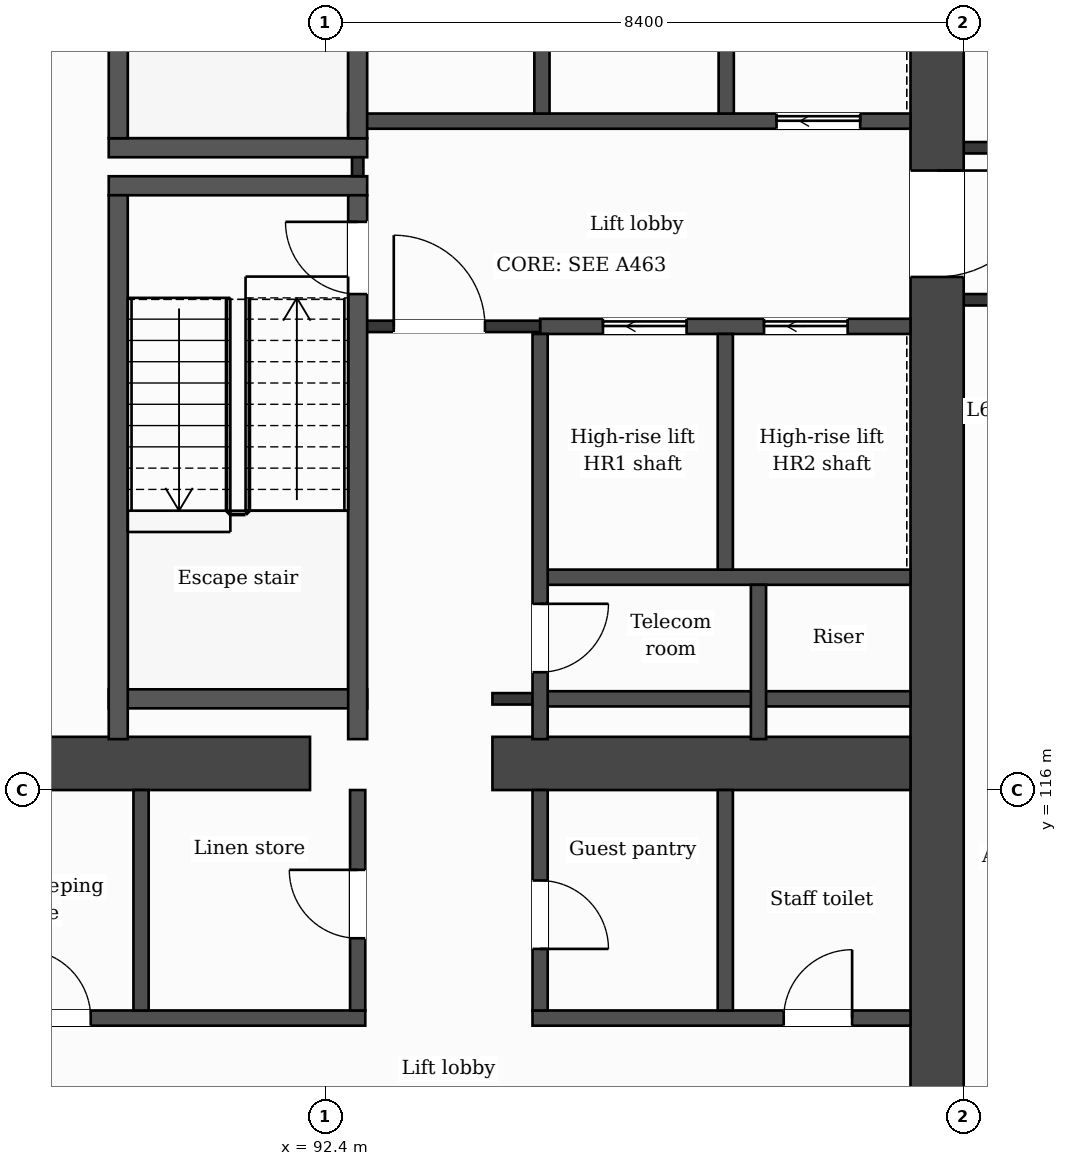
"""IFC4 building model, lengths in metres.
Left out: names, types, materials, properties, quantities, classifications, styles, units other than length and angle.
Written with IfcOpenShell. Run it as: python <this file> out.ifc"""

import sys

from ifc_helpers import new_model, si_unit, direction, frame, frame_2d, origin, place, context, subcontext, project, spatial, rectangle, extrude, element, fill, save


model = new_model("IFC4")
c1 = context("Model", 3, precision=1e-05, world=origin(), true_north=direction((0.0, 1.0)))
c2 = subcontext(c1, "Body", "Model", "MODEL_VIEW")
j1 = project(units=[si_unit("LENGTHUNIT", "METRE"), si_unit("PLANEANGLEUNIT", "RADIAN")], contexts=[c1])
p1 = place(None, origin())
s1 = spatial("IfcSite", under=j1, at=p1, CompositionType="ELEMENT")
p2 = place(p1, origin())
s2 = spatial("IfcBuilding", under=s1, at=p2, CompositionType="ELEMENT")
p3 = place(p2, frame((0.0, 0.0, 259.0)))
s3 = spatial("IfcBuildingStorey", under=s2, at=p3, CompositionType="ELEMENT", Elevation=259.0)
p4 = place(p3, frame((100.45, 132.05, 0.0), z_axis=(0.0, 0.0, 1.0), x_axis=(0.0, -1.0, 0.0)))
e1 = element("IfcWall", 1, at=p4, inside=s3, PredefinedType="SHEAR", context=c2, shape_type="SweptSolid", body=[
    extrude(rectangle(XDim=21.3, YDim=0.7, at=frame_2d((10.65, 0.0))), origin(), (0.0, 0.0, 1.0), 3.7),
])
p5 = place(p4, frame((7.9, 0.0, 0.0)))
e2 = element("IfcOpeningElement", 2, at=p5, cuts=e1, PredefinedType="OPENING", context=c2, shape_type="SweptSolid", body=[
    extrude(rectangle(XDim=1.4, YDim=2.1, at=frame_2d((0.7, 1.05))), frame((0.0, 0.36, 0.0), z_axis=(0.0, -1.0, 0.0), x_axis=(1.0, 0.0, 0.0)), (0.0, 0.0, 1.0), 0.72),
])
p6 = place(p3, frame((86.07, 110.75, 0.0), z_axis=(0.0, 0.0, 1.0), x_axis=(0.133406218907, 0.991061441464, 0.0)))
e3 = element("IfcWall", 3, at=p6, inside=s3, PredefinedType="SHEAR", context=c2, shape_type="SweptSolid", body=[
    extrude(rectangle(XDim=21.492, YDim=0.7, at=frame_2d((10.746, 0.0))), origin(), (0.0, 0.0, 1.0), 3.7),
])
p7 = place(p3, frame((87.123, 116.35, 0.0), z_axis=(0.0, 0.0, 1.0), x_axis=(1.0, 0.0, 0.0)))
e4 = element("IfcWall", 4, at=p7, inside=s3, PredefinedType="SHEAR", context=c2, shape_type="SweptSolid", body=[
    extrude(rectangle(XDim=5.077, YDim=0.7, at=frame_2d((2.539, 0.0))), origin(), (0.0, 0.0, 1.0), 3.7),
])
p8 = place(p3, frame((94.6, 116.35, 0.0), z_axis=(0.0, 0.0, 1.0), x_axis=(1.0, 0.0, 0.0)))
e5 = element("IfcWall", 5, at=p8, inside=s3, PredefinedType="SHEAR", context=c2, shape_type="SweptSolid", body=[
    extrude(rectangle(XDim=5.5, YDim=0.7, at=frame_2d((2.75, 0.0))), origin(), (0.0, 0.0, 1.0), 3.7),
])
p9 = place(p3, frame((86.696, 113.0, 0.0), z_axis=(0.0, 0.0, 1.0), x_axis=(1.0, 0.0, 0.0)))
e6 = element("IfcWall", 6, at=p9, inside=s3, PredefinedType="PARTITIONING", context=c2, shape_type="SweptSolid", body=[
    extrude(rectangle(XDim=6.231, YDim=0.2, at=frame_2d((3.116, 0.0))), origin(), (0.0, 0.0, 1.0), 3.38),
])
p10 = place(p9, frame((1.719, 0.0, 0.0)))
e7 = element("IfcOpeningElement", 7, at=p10, cuts=e6, PredefinedType="OPENING", context=c2, shape_type="SweptSolid", body=[
    extrude(rectangle(XDim=0.9, YDim=2.1, at=frame_2d((0.45, 1.05))), frame((0.0, 0.11, 0.0), z_axis=(0.0, -1.0, 0.0), x_axis=(1.0, 0.0, 0.0)), (0.0, 0.0, 1.0), 0.22),
])
p11 = place(p3, frame((95.127, 113.0, 0.0), z_axis=(0.0, 0.0, 1.0), x_axis=(1.0, 0.0, 0.0)))
e8 = element("IfcWall", 8, at=p11, inside=s3, PredefinedType="PARTITIONING", context=c2, shape_type="SweptSolid", body=[
    extrude(rectangle(XDim=4.973, YDim=0.2, at=frame_2d((2.487, 0.0))), origin(), (0.0, 0.0, 1.0), 3.38),
])
p12 = place(p11, frame((3.305, 0.0, 0.0)))
e9 = element("IfcOpeningElement", 9, at=p12, cuts=e8, PredefinedType="OPENING", context=c2, shape_type="SweptSolid", body=[
    extrude(rectangle(XDim=0.9, YDim=2.1, at=frame_2d((0.45, 1.05))), frame((0.0, 0.11, 0.0), z_axis=(0.0, -1.0, 0.0), x_axis=(1.0, 0.0, 0.0)), (0.0, 0.0, 1.0), 0.22),
])
p13 = place(p3, frame((95.227, 117.2, 0.0), z_axis=(0.0, 0.0, 1.0), x_axis=(1.0, 0.0, 0.0)))
e10 = element("IfcWall", 10, at=p13, inside=s3, PredefinedType="PARTITIONING", context=c2, shape_type="SweptSolid", body=[
    extrude(rectangle(XDim=4.873, YDim=0.2, at=frame_2d((2.437, 0.0))), origin(), (0.0, 0.0, 1.0), 3.38),
])
p14 = place(p3, frame((94.6, 117.2, 0.0), z_axis=(0.0, 0.0, 1.0), x_axis=(1.0, 0.0, 0.0)))
e11 = element("IfcWall", 11, at=p14, inside=s3, PredefinedType="PARTITIONING", context=c2, shape_type="SweptSolid", body=[
    extrude(rectangle(XDim=0.627, YDim=0.15, at=frame_2d((0.313, 0.0))), origin(), (0.0, 0.0, 1.0), 3.38),
])
p15 = place(p3, frame((89.552, 117.2, 0.0), z_axis=(0.0, 0.0, 1.0), x_axis=(1.0, 0.0, 0.0)))
e12 = element("IfcWall", 12, at=p15, inside=s3, PredefinedType="PARTITIONING", context=c2, shape_type="SweptSolid", body=[
    extrude(rectangle(XDim=3.4, YDim=0.25, at=frame_2d((1.7, 0.0))), origin(), (0.0, 0.0, 1.0), 3.38),
])
p16 = place(p3, frame((95.227, 118.8, 0.0), z_axis=(0.0, 0.0, 1.0), x_axis=(1.0, 0.0, 0.0)))
e13 = element("IfcWall", 13, at=p16, inside=s3, PredefinedType="PARTITIONING", context=c2, shape_type="SweptSolid", body=[
    extrude(rectangle(XDim=4.873, YDim=0.2, at=frame_2d((2.437, 0.0))), origin(), (0.0, 0.0, 1.0), 3.38),
])
p17 = place(p3, frame((95.227, 122.1, 0.0), z_axis=(0.0, 0.0, 1.0), x_axis=(1.0, 0.0, 0.0)))
e14 = element("IfcWall", 14, at=p17, inside=s3, PredefinedType="PARTITIONING", context=c2, shape_type="SweptSolid", body=[
    extrude(rectangle(XDim=4.873, YDim=0.2, at=frame_2d((2.437, 0.0))), origin(), (0.0, 0.0, 1.0), 3.38),
])
p18 = place(p17, frame((0.827, 0.0, 0.0)))
e15 = element("IfcOpeningElement", 15, at=p18, cuts=e14, PredefinedType="OPENING", context=c2, shape_type="SweptSolid", body=[
    extrude(rectangle(XDim=1.1, YDim=2.1, at=frame_2d((0.55, 1.05))), frame((0.0, 0.11, 0.0), z_axis=(0.0, -1.0, 0.0), x_axis=(1.0, 0.0, 0.0)), (0.0, 0.0, 1.0), 0.22),
])
p19 = place(p17, frame((2.946, 0.0, 0.0)))
e16 = element("IfcOpeningElement", 16, at=p19, cuts=e14, PredefinedType="OPENING", context=c2, shape_type="SweptSolid", body=[
    extrude(rectangle(XDim=1.1, YDim=2.1, at=frame_2d((0.55, 1.05))), frame((0.0, 0.11, 0.0), z_axis=(0.0, -1.0, 0.0), x_axis=(1.0, 0.0, 0.0)), (0.0, 0.0, 1.0), 0.22),
])
p20 = place(p3, frame((92.827, 122.1, 0.0), z_axis=(0.0, 0.0, 1.0), x_axis=(1.0, 0.0, 0.0)))
e17 = element("IfcWall", 17, at=p20, inside=s3, PredefinedType="PARTITIONING", context=c2, shape_type="SweptSolid", body=[
    extrude(rectangle(XDim=2.4, YDim=0.15, at=frame_2d((1.2, 0.0))), origin(), (0.0, 0.0, 1.0), 3.38),
])
p21 = place(p20, frame((0.475, 0.0, 0.0)))
e18 = element("IfcOpeningElement", 18, at=p21, cuts=e17, PredefinedType="OPENING", context=c2, shape_type="SweptSolid", body=[
    extrude(rectangle(XDim=1.2, YDim=2.1, at=frame_2d((0.6, 1.05))), frame((0.0, 0.085, 0.0), z_axis=(0.0, -1.0, 0.0), x_axis=(1.0, 0.0, 0.0)), (0.0, 0.0, 1.0), 0.17),
])
p22 = place(p3, frame((100.8, 122.45, 0.0), z_axis=(0.0, 0.0, 1.0), x_axis=(1.0, 0.0, 0.0)))
e19 = element("IfcWall", 19, at=p22, inside=s3, PredefinedType="PARTITIONING", context=c2, shape_type="SweptSolid", body=[
    extrude(rectangle(XDim=25.2, YDim=0.15, at=frame_2d((12.6, 0.0))), origin(), (0.0, 0.0, 1.0), 3.38),
])
p23 = place(p22, frame((0.63, 0.0, 0.0)))
e20 = element("IfcOpeningElement", 20, at=p23, cuts=e19, PredefinedType="OPENING", context=c2, shape_type="SweptSolid", body=[
    extrude(rectangle(XDim=1.0, YDim=2.1, at=frame_2d((0.5, 1.05))), frame((0.0, 0.085, 0.0), z_axis=(0.0, -1.0, 0.0), x_axis=(1.0, 0.0, 0.0)), (0.0, 0.0, 1.0), 0.17),
])
p24 = place(p22, frame((6.875, 0.0, 0.0)))
e21 = element("IfcOpeningElement", 21, at=p24, cuts=e19, PredefinedType="OPENING", context=c2, shape_type="SweptSolid", body=[
    extrude(rectangle(XDim=0.95, YDim=2.1, at=frame_2d((0.475, 1.05))), frame((0.0, 0.085, 0.0), z_axis=(0.0, -1.0, 0.0), x_axis=(1.0, 0.0, 0.0)), (0.0, 0.0, 1.0), 0.17),
])
p25 = place(p22, frame((8.925, 0.0, 0.0)))
e22 = element("IfcOpeningElement", 22, at=p25, cuts=e19, PredefinedType="OPENING", context=c2, shape_type="SweptSolid", body=[
    extrude(rectangle(XDim=1.0, YDim=2.1, at=frame_2d((0.5, 1.05))), frame((0.0, 0.085, 0.0), z_axis=(0.0, -1.0, 0.0), x_axis=(1.0, 0.0, 0.0)), (0.0, 0.0, 1.0), 0.17),
])
p26 = place(p22, frame((20.5, 0.0, 0.0)))
e23 = element("IfcOpeningElement", 23, at=p26, cuts=e19, PredefinedType="OPENING", context=c2, shape_type="SweptSolid", body=[
    extrude(rectangle(XDim=1.0, YDim=2.1, at=frame_2d((0.5, 1.05))), frame((0.0, 0.085, 0.0), z_axis=(0.0, -1.0, 0.0), x_axis=(1.0, 0.0, 0.0)), (0.0, 0.0, 1.0), 0.17),
])
for number, where, z_axis, x_axis in (
    (24, (89.552, 123.95, 0.0), (0.0, 0.0, 1.0), (1.0, 0.0, 0.0)),
    (25, (89.552, 124.45, 0.0), (0.0, 0.0, 1.0), (1.0, 0.0, 0.0)),
):
    element("IfcWall", number, at=place(p3, frame(where, z_axis=z_axis, x_axis=x_axis)), inside=s3, PredefinedType="PARTITIONING", context=c2, shape_type="SweptSolid", body=[
        extrude(rectangle(XDim=3.4, YDim=0.25, at=frame_2d((1.7, 0.0))), origin(), (0.0, 0.0, 1.0), 3.38),
    ])
p27 = place(p3, frame((100.8, 124.45, 0.0), z_axis=(0.0, 0.0, 1.0), x_axis=(1.0, 0.0, 0.0)))
e26 = element("IfcWall", 26, at=p27, inside=s3, PredefinedType="PARTITIONING", context=c2, shape_type="SweptSolid", body=[
    extrude(rectangle(XDim=25.2, YDim=0.15, at=frame_2d((12.6, 0.0))), origin(), (0.0, 0.0, 1.0), 3.38),
])
p28 = place(p27, frame((2.025, 0.0, 0.0)))
e27 = element("IfcOpeningElement", 27, at=p28, cuts=e26, PredefinedType="OPENING", context=c2, shape_type="SweptSolid", body=[
    extrude(rectangle(XDim=1.0, YDim=2.1, at=frame_2d((0.5, 1.05))), frame((0.0, 0.085, 0.0), z_axis=(0.0, -1.0, 0.0), x_axis=(1.0, 0.0, 0.0)), (0.0, 0.0, 1.0), 0.17),
])
p29 = place(p27, frame((9.27, 0.0, 0.0)))
e28 = element("IfcOpeningElement", 28, at=p29, cuts=e26, PredefinedType="OPENING", context=c2, shape_type="SweptSolid", body=[
    extrude(rectangle(XDim=1.0, YDim=2.1, at=frame_2d((0.5, 1.05))), frame((0.0, 0.085, 0.0), z_axis=(0.0, -1.0, 0.0), x_axis=(1.0, 0.0, 0.0)), (0.0, 0.0, 1.0), 0.17),
])
p30 = place(p27, frame((13.575, 0.0, 0.0)))
e29 = element("IfcOpeningElement", 29, at=p30, cuts=e26, PredefinedType="OPENING", context=c2, shape_type="SweptSolid", body=[
    extrude(rectangle(XDim=1.0, YDim=2.1, at=frame_2d((0.5, 1.05))), frame((0.0, 0.085, 0.0), z_axis=(0.0, -1.0, 0.0), x_axis=(1.0, 0.0, 0.0)), (0.0, 0.0, 1.0), 0.17),
])
p31 = place(p27, frame((21.17, 0.0, 0.0)))
e30 = element("IfcOpeningElement", 30, at=p31, cuts=e26, PredefinedType="OPENING", context=c2, shape_type="SweptSolid", body=[
    extrude(rectangle(XDim=1.0, YDim=2.1, at=frame_2d((0.5, 1.05))), frame((0.0, 0.085, 0.0), z_axis=(0.0, -1.0, 0.0), x_axis=(1.0, 0.0, 0.0)), (0.0, 0.0, 1.0), 0.17),
])
p32 = place(p3, frame((92.702, 124.8, 0.0), z_axis=(0.0, 0.0, 1.0), x_axis=(1.0, 0.0, 0.0)))
e31 = element("IfcWall", 31, at=p32, inside=s3, PredefinedType="PARTITIONING", context=c2, shape_type="SweptSolid", body=[
    extrude(rectangle(XDim=7.398, YDim=0.2, at=frame_2d((3.699, 0.0))), origin(), (0.0, 0.0, 1.0), 3.38),
])
p33 = place(p32, frame((5.636, 0.0, 0.0)))
e32 = element("IfcOpeningElement", 32, at=p33, cuts=e31, PredefinedType="OPENING", context=c2, shape_type="SweptSolid", body=[
    extrude(rectangle(XDim=1.1, YDim=2.1, at=frame_2d((0.55, 1.05))), frame((0.0, 0.11, 0.0), z_axis=(0.0, -1.0, 0.0), x_axis=(1.0, 0.0, 0.0)), (0.0, 0.0, 1.0), 0.22),
])
for number, where, z_axis, x_axis in (
    (33, (89.677, 116.67, 0.0), (0.0, 0.0, 1.0), (0.0, 1.0, 0.0)),
    (34, (89.677, 124.575, 0.0), (0.0, 0.0, 1.0), (0.0, 1.0, 0.0)),
):
    element("IfcWall", number, at=place(p3, frame(where, z_axis=z_axis, x_axis=x_axis)), inside=s3, PredefinedType="PARTITIONING", context=c2, shape_type="SweptSolid", body=[
        extrude(rectangle(XDim=7.155, YDim=0.25, at=frame_2d((3.578, 0.0))), origin(), (0.0, 0.0, 1.0), 3.38),
    ])
p34 = place(p3, frame((89.977, 113.1, 0.0), z_axis=(0.0, 0.0, 1.0), x_axis=(0.0, 1.0, 0.0)))
e35 = element("IfcWall", 35, at=p34, inside=s3, PredefinedType="PARTITIONING", context=c2, shape_type="SweptSolid", body=[
    extrude(rectangle(XDim=2.9, YDim=0.2, at=frame_2d((1.45, 0.0))), origin(), (0.0, 0.0, 1.0), 3.38),
])
p35 = place(p3, frame((92.827, 113.1, 0.0), z_axis=(0.0, 0.0, 1.0), x_axis=(0.0, 1.0, 0.0)))
e36 = element("IfcWall", 36, at=p35, inside=s3, PredefinedType="PARTITIONING", context=c2, shape_type="SweptSolid", body=[
    extrude(rectangle(XDim=2.9, YDim=0.2, at=frame_2d((1.45, 0.0))), origin(), (0.0, 0.0, 1.0), 3.38),
])
p36 = place(p35, frame((0.95, 0.0, 0.0)))
e37 = element("IfcOpeningElement", 37, at=p36, cuts=e36, PredefinedType="OPENING", context=c2, shape_type="SweptSolid", body=[
    extrude(rectangle(XDim=0.9, YDim=2.1, at=frame_2d((0.45, 1.05))), frame((0.0, 0.11, 0.0), z_axis=(0.0, -1.0, 0.0), x_axis=(1.0, 0.0, 0.0)), (0.0, 0.0, 1.0), 0.22),
])
p37 = place(p3, frame((92.827, 124.075, 0.0), z_axis=(0.0, 0.0, 1.0), x_axis=(0.0, 1.0, 0.0)))
e38 = element("IfcWall", 38, at=p37, inside=s3, PredefinedType="PARTITIONING", context=c2, shape_type="SweptSolid", body=[
    extrude(rectangle(XDim=0.25, YDim=0.15, at=frame_2d((0.125, 0.0))), origin(), (0.0, 0.0, 1.0), 3.38),
])
p38 = place(p3, frame((92.827, 116.67, 0.0), z_axis=(0.0, 0.0, 1.0), x_axis=(0.0, 1.0, 0.0)))
e39 = element("IfcWall", 39, at=p38, inside=s3, PredefinedType="PARTITIONING", context=c2, shape_type="SweptSolid", body=[
    extrude(rectangle(XDim=7.155, YDim=0.25, at=frame_2d((3.578, 0.0))), origin(), (0.0, 0.0, 1.0), 3.38),
])
p39 = place(p38, frame((5.855, 0.0, 0.0)))
e40 = element("IfcOpeningElement", 40, at=p39, cuts=e39, PredefinedType="OPENING", context=c2, shape_type="SweptSolid", body=[
    extrude(rectangle(XDim=0.95, YDim=2.1, at=frame_2d((0.475, 1.05))), frame((0.0, 0.135, 0.0), z_axis=(0.0, -1.0, 0.0), x_axis=(1.0, 0.0, 0.0)), (0.0, 0.0, 1.0), 0.27),
])
p40 = place(p3, frame((92.827, 124.575, 0.0), z_axis=(0.0, 0.0, 1.0), x_axis=(0.0, 1.0, 0.0)))
e41 = element("IfcWall", 41, at=p40, inside=s3, PredefinedType="PARTITIONING", context=c2, shape_type="SweptSolid", body=[
    extrude(rectangle(XDim=7.155, YDim=0.25, at=frame_2d((3.578, 0.0))), origin(), (0.0, 0.0, 1.0), 3.38),
])
p41 = place(p40, frame((5.325, 0.0, 0.0)))
e42 = element("IfcOpeningElement", 42, at=p41, cuts=e41, PredefinedType="OPENING", context=c2, shape_type="SweptSolid", body=[
    extrude(rectangle(XDim=1.0, YDim=2.1, at=frame_2d((0.5, 1.05))), frame((0.0, 0.135, 0.0), z_axis=(0.0, -1.0, 0.0), x_axis=(1.0, 0.0, 0.0)), (0.0, 0.0, 1.0), 0.27),
])
p42 = place(p3, frame((95.227, 113.1, 0.0), z_axis=(0.0, 0.0, 1.0), x_axis=(0.0, 1.0, 0.0)))
e43 = element("IfcWall", 43, at=p42, inside=s3, PredefinedType="PARTITIONING", context=c2, shape_type="SweptSolid", body=[
    extrude(rectangle(XDim=2.9, YDim=0.2, at=frame_2d((1.45, 0.0))), origin(), (0.0, 0.0, 1.0), 3.38),
])
p43 = place(p42, frame((0.81, 0.0, 0.0)))
e44 = element("IfcOpeningElement", 44, at=p43, cuts=e43, PredefinedType="OPENING", context=c2, shape_type="SweptSolid", body=[
    extrude(rectangle(XDim=0.9, YDim=2.1, at=frame_2d((0.45, 1.05))), frame((0.0, 0.11, 0.0), z_axis=(0.0, -1.0, 0.0), x_axis=(1.0, 0.0, 0.0)), (0.0, 0.0, 1.0), 0.22),
])
p44 = place(p3, frame((95.227, 116.67, 0.0), z_axis=(0.0, 0.0, 1.0), x_axis=(0.0, 1.0, 0.0)))
e45 = element("IfcWall", 45, at=p44, inside=s3, PredefinedType="PARTITIONING", context=c2, shape_type="SweptSolid", body=[
    extrude(rectangle(XDim=5.33, YDim=0.2, at=frame_2d((2.665, 0.0))), origin(), (0.0, 0.0, 1.0), 3.38),
])
p45 = place(p44, frame((0.88, 0.0, 0.0)))
e46 = element("IfcOpeningElement", 46, at=p45, cuts=e45, PredefinedType="OPENING", context=c2, shape_type="SweptSolid", body=[
    extrude(rectangle(XDim=0.9, YDim=2.1, at=frame_2d((0.45, 1.05))), frame((0.0, 0.11, 0.0), z_axis=(0.0, -1.0, 0.0), x_axis=(1.0, 0.0, 0.0)), (0.0, 0.0, 1.0), 0.22),
])
p46 = place(p3, frame((95.251, 124.9, 0.0), z_axis=(0.0, 0.0, 1.0), x_axis=(0.0, 1.0, 0.0)))
e47 = element("IfcWall", 47, at=p46, inside=s3, PredefinedType="PARTITIONING", context=c2, shape_type="SweptSolid", body=[
    extrude(rectangle(XDim=3.1, YDim=0.2, at=frame_2d((1.55, 0.0))), origin(), (0.0, 0.0, 1.0), 3.38),
])
p47 = place(p3, frame((97.664, 113.1, 0.0), z_axis=(0.0, 0.0, 1.0), x_axis=(0.0, 1.0, 0.0)))
e48 = element("IfcWall", 48, at=p47, inside=s3, PredefinedType="PARTITIONING", context=c2, shape_type="SweptSolid", body=[
    extrude(rectangle(XDim=2.9, YDim=0.2, at=frame_2d((1.45, 0.0))), origin(), (0.0, 0.0, 1.0), 3.38),
])
for number, where, z_axis, x_axis in (
    (49, (97.664, 118.9, 0.0), (0.0, 0.0, 1.0), (0.0, 1.0, 0.0)),
    (50, (97.676, 124.9, 0.0), (0.0, 0.0, 1.0), (0.0, 1.0, 0.0)),
):
    element("IfcWall", number, at=place(p3, frame(where, z_axis=z_axis, x_axis=x_axis)), inside=s3, PredefinedType="PARTITIONING", context=c2, shape_type="SweptSolid", body=[
        extrude(rectangle(XDim=3.1, YDim=0.2, at=frame_2d((1.55, 0.0))), origin(), (0.0, 0.0, 1.0), 3.38),
    ])
p48 = place(p3, frame((98.1, 116.67, 0.0), z_axis=(0.0, 0.0, 1.0), x_axis=(0.0, 1.0, 0.0)))
e51 = element("IfcWall", 51, at=p48, inside=s3, PredefinedType="PARTITIONING", context=c2, shape_type="SweptSolid", body=[
    extrude(rectangle(XDim=2.03, YDim=0.2, at=frame_2d((1.015, 0.0))), origin(), (0.0, 0.0, 1.0), 3.38),
])
p49 = place(p21, origin())
e52 = element("IfcDoor", 52, at=p49, inside=s3, OperationType="SINGLE_SWING_LEFT", PredefinedType="DOOR", context=c2, shape_type="SweptSolid", body=[
    extrude(rectangle(XDim=1.2, YDim=2.1, at=frame_2d((0.6, 1.05))), frame((0.0, 0.025, 0.0), z_axis=(0.0, -1.0, 0.0), x_axis=(1.0, 0.0, 0.0)), (0.0, 0.0, 1.0), 0.05),
])
fill(e18, e52)
p50 = place(p18, origin())
e53 = element("IfcDoor", 53, at=p50, inside=s3, OperationType="SLIDING_TO_LEFT", PredefinedType="DOOR", context=c2, shape_type="SweptSolid", body=[
    extrude(rectangle(XDim=1.1, YDim=2.1, at=frame_2d((0.55, 1.05))), frame((0.0, 0.025, 0.0), z_axis=(0.0, -1.0, 0.0), x_axis=(1.0, 0.0, 0.0)), (0.0, 0.0, 1.0), 0.05),
])
fill(e15, e53)
p51 = place(p19, origin())
e54 = element("IfcDoor", 54, at=p51, inside=s3, OperationType="SLIDING_TO_LEFT", PredefinedType="DOOR", context=c2, shape_type="SweptSolid", body=[
    extrude(rectangle(XDim=1.1, YDim=2.1, at=frame_2d((0.55, 1.05))), frame((0.0, 0.025, 0.0), z_axis=(0.0, -1.0, 0.0), x_axis=(1.0, 0.0, 0.0)), (0.0, 0.0, 1.0), 0.05),
])
fill(e16, e54)
p52 = place(p33, origin())
e55 = element("IfcDoor", 55, at=p52, inside=s3, OperationType="SLIDING_TO_LEFT", PredefinedType="DOOR", context=c2, shape_type="SweptSolid", body=[
    extrude(rectangle(XDim=1.1, YDim=2.1, at=frame_2d((0.55, 1.05))), frame((0.0, 0.025, 0.0), z_axis=(0.0, -1.0, 0.0), x_axis=(1.0, 0.0, 0.0)), (0.0, 0.0, 1.0), 0.05),
])
fill(e32, e55)
p53 = place(p39, origin())
e56 = element("IfcDoor", 56, at=p53, inside=s3, OperationType="SINGLE_SWING_RIGHT", PredefinedType="DOOR", context=c2, shape_type="SweptSolid", body=[
    extrude(rectangle(XDim=0.95, YDim=2.1, at=frame_2d((0.475, 1.05))), frame((0.0, 0.025, 0.0), z_axis=(0.0, -1.0, 0.0), x_axis=(1.0, 0.0, 0.0)), (0.0, 0.0, 1.0), 0.05),
])
fill(e40, e56)
p54 = place(p45, origin())
e57 = element("IfcDoor", 57, at=p54, inside=s3, OperationType="SINGLE_SWING_RIGHT", PredefinedType="DOOR", context=c2, shape_type="SweptSolid", body=[
    extrude(rectangle(XDim=0.9, YDim=2.1, at=frame_2d((0.45, 1.05))), frame((0.0, 0.025, 0.0), z_axis=(0.0, -1.0, 0.0), x_axis=(1.0, 0.0, 0.0)), (0.0, 0.0, 1.0), 0.05),
])
fill(e46, e57)
p55 = place(p10, origin())
e58 = element("IfcDoor", 58, at=p55, inside=s3, OperationType="SINGLE_SWING_LEFT", PredefinedType="DOOR", context=c2, shape_type="SweptSolid", body=[
    extrude(rectangle(XDim=0.9, YDim=2.1, at=frame_2d((0.45, 1.05))), frame((0.0, 0.025, 0.0), z_axis=(0.0, -1.0, 0.0), x_axis=(1.0, 0.0, 0.0)), (0.0, 0.0, 1.0), 0.05),
])
fill(e7, e58)
p56 = place(p36, origin())
e59 = element("IfcDoor", 59, at=p56, inside=s3, OperationType="SINGLE_SWING_RIGHT", PredefinedType="DOOR", context=c2, shape_type="SweptSolid", body=[
    extrude(rectangle(XDim=0.9, YDim=2.1, at=frame_2d((0.45, 1.05))), frame((0.0, 0.025, 0.0), z_axis=(0.0, -1.0, 0.0), x_axis=(1.0, 0.0, 0.0)), (0.0, 0.0, 1.0), 0.05),
])
fill(e37, e59)
p57 = place(p43, origin())
e60 = element("IfcDoor", 60, at=p57, inside=s3, OperationType="SINGLE_SWING_LEFT", PredefinedType="DOOR", context=c2, shape_type="SweptSolid", body=[
    extrude(rectangle(XDim=0.9, YDim=2.1, at=frame_2d((0.45, 1.05))), frame((0.0, 0.025, 0.0), z_axis=(0.0, -1.0, 0.0), x_axis=(1.0, 0.0, 0.0)), (0.0, 0.0, 1.0), 0.05),
])
fill(e44, e60)
p58 = place(p12, origin())
e61 = element("IfcDoor", 61, at=p58, inside=s3, OperationType="SINGLE_SWING_RIGHT", PredefinedType="DOOR", context=c2, shape_type="SweptSolid", body=[
    extrude(rectangle(XDim=0.9, YDim=2.1, at=frame_2d((0.45, 1.05))), frame((0.0, 0.025, 0.0), z_axis=(0.0, -1.0, 0.0), x_axis=(1.0, 0.0, 0.0)), (0.0, 0.0, 1.0), 0.05),
])
fill(e9, e61)
p59 = place(p5, origin())
e62 = element("IfcDoor", 62, at=p59, inside=s3, OperationType="SINGLE_SWING_LEFT", PredefinedType="DOOR", context=c2, shape_type="SweptSolid", body=[
    extrude(rectangle(XDim=1.4, YDim=2.1, at=frame_2d((0.7, 1.05))), frame((0.0, 0.025, 0.0), z_axis=(0.0, -1.0, 0.0), x_axis=(1.0, 0.0, 0.0)), (0.0, 0.0, 1.0), 0.05),
])
fill(e2, e62)
save(model, sys.argv[1])
